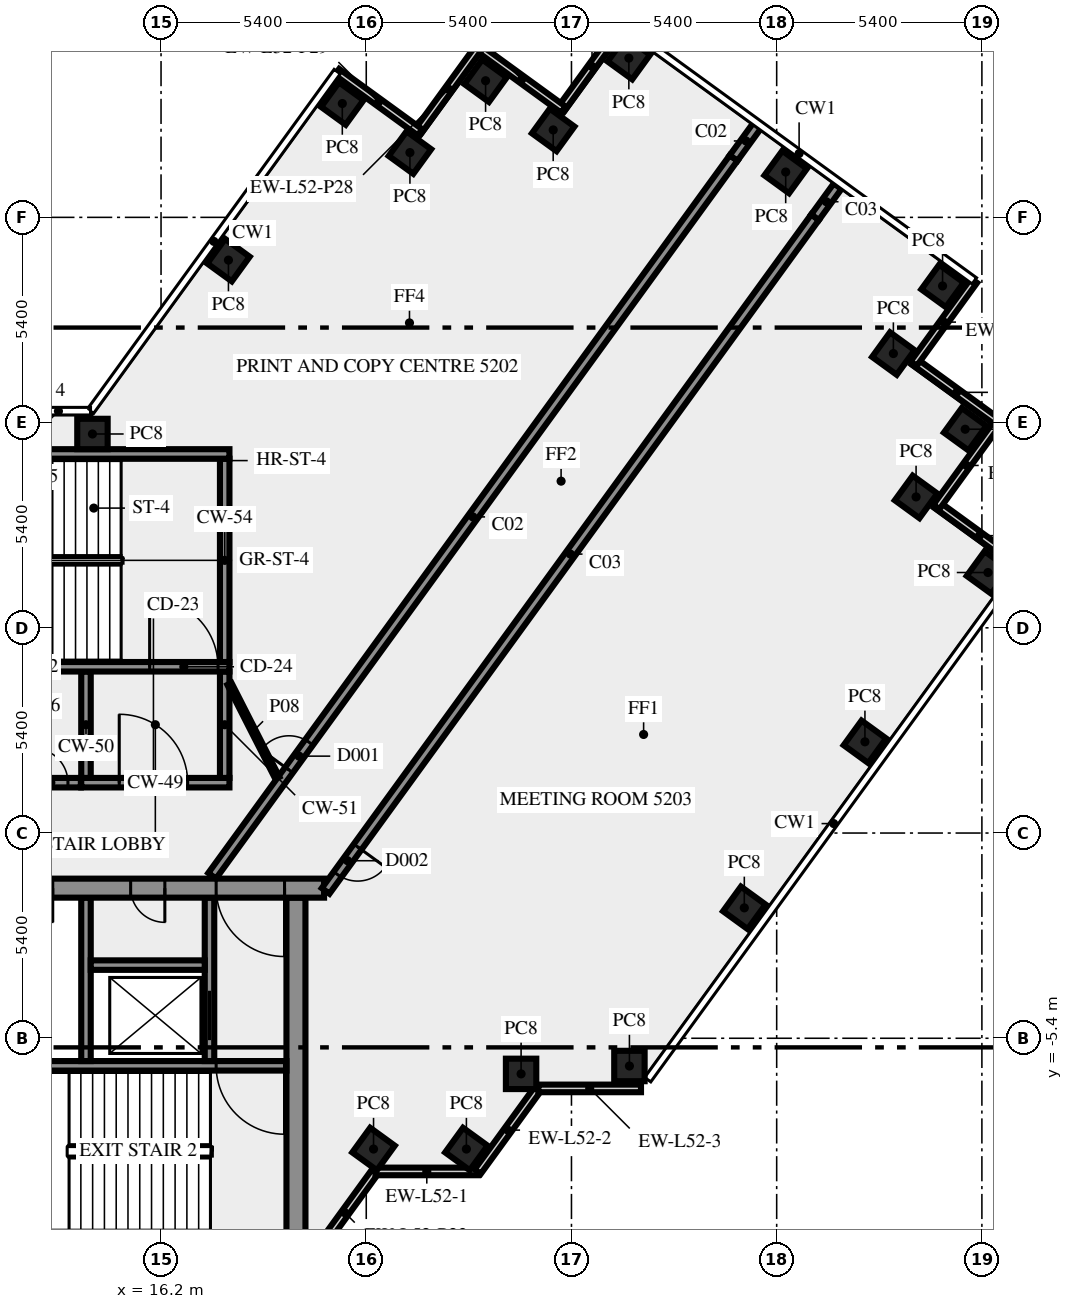
"""IFC4 building model, lengths in metres.
Left out: names, types, materials, properties, quantities, classifications, styles, units other than length and angle.
Written with IfcOpenShell. Run it as: python <this file> out.ifc"""

import sys

from ifc_helpers import new_model, si_unit, direction, frame, frame_2d, origin, origin_2d, place, context, subcontext, project, spatial, rectangle, extrude, element, fill, save


model = new_model("IFC4")
c1 = context("Model", 3, precision=1e-05, world=origin(), true_north=direction((0.0, 1.0)))
c2 = subcontext(c1, "Body", "Model", "MODEL_VIEW")
j1 = project(units=[si_unit("LENGTHUNIT", "METRE"), si_unit("PLANEANGLEUNIT", "RADIAN")], contexts=[c1])
p1 = place(None, origin())
s1 = spatial("IfcSite", under=j1, at=p1, CompositionType="ELEMENT")
p2 = place(p1, origin())
s2 = spatial("IfcBuilding", under=s1, at=p2, CompositionType="ELEMENT")
p3 = place(p2, frame((0.0, 0.0, 222.0)))
s3 = spatial("IfcBuildingStorey", under=s2, at=p3, CompositionType="ELEMENT", Elevation=222.0)
for number, where, z_axis, x_axis in (
    (1, (21.792, -8.315, 0.0), (0.0, 0.0, 1.0), (0.588, 0.809, 0.0)),
    (2, (24.235, -8.315, 0.0), (0.0, 0.0, 1.0), (0.588, 0.809, 0.0)),
    (3, (25.674, -6.337, 0.0), (0.0, 0.0, 1.0), (1.0, 0.0, 0.0)),
    (4, (28.525, -6.13, 0.0), (0.0, 0.0, 1.0), (1.0, 0.0, 0.0)),
    (5, (31.548, -1.969, 0.0), (0.0, 0.0, 1.0), (0.588, 0.809, 0.0)),
    (6, (34.722, 2.4, 0.0), (0.0, 0.0, 1.0), (0.588, 0.809, 0.0)),
    (7, (37.96, 6.855, 0.0), (0.0, 0.0, 1.0), (0.588, 0.809, 0.0)),
    (8, (36.068, 8.844, 0.0), (0.0, 0.0, 1.0), (0.588, 0.809, 0.0)),
    (9, (37.36, 10.625, 0.0), (0.0, 0.0, 1.0), (0.588, 0.809, 0.0)),
    (10, (35.471, 12.616, 0.0), (0.0, 0.0, 1.0), (-0.809, 0.588, 0.0)),
    (11, (36.765, 14.395, 0.0), (0.0, 0.0, 1.0), (-0.809, 0.588, 0.0)),
    (12, (32.637, 17.393, 0.0), (0.0, 0.0, 1.0), (-0.809, 0.588, 0.0)),
    (13, (28.51, 20.39, 0.0), (0.0, 0.0, 1.0), (-0.588, -0.809, 0.0)),
    (14, (26.519, 18.5, 0.0), (0.0, 0.0, 1.0), (-0.809, 0.588, 0.0)),
    (15, (24.74, 19.795, 0.0), (0.0, 0.0, 1.0), (-0.588, -0.809, 0.0)),
    (16, (22.749, 17.904, 0.0), (0.0, 0.0, 1.0), (-0.588, -0.809, 0.0)),
    (17, (20.97, 19.195, 0.0), (0.0, 0.0, 1.0), (-0.588, -0.809, 0.0)),
    (18, (17.974, 15.075, 0.0), (0.0, 0.0, 1.0), (-0.588, -0.809, 0.0)),
    (19, (14.395, 10.5, 0.0), (0.0, 0.0, 1.0), (-1.0, 0.0, 0.0)),
):
    element("IfcColumn", number, at=place(p3, frame(where, z_axis=z_axis, x_axis=x_axis)), inside=s3, PredefinedType="COLUMN", context=c2, shape_type="SweptSolid", body=[
        extrude(rectangle(XDim=0.8, YDim=0.8, at=origin_2d()), origin(), (0.0, 0.0, 1.0), 3.65),
    ])
for number, where, z_axis, x_axis in (
    (20, (38.829, 7.031, 0.0), (0.0, 0.0, 1.0), (-0.809, 0.588, 0.0)),
    (21, (36.602, 8.58, 0.0), (0.0, 0.0, 1.0), (0.588, 0.809, 0.0)),
    (22, (38.231, 10.802, 0.0), (0.0, 0.0, 1.0), (-0.809, 0.588, 0.0)),
):
    element("IfcWall", number, at=place(p3, frame(where, z_axis=z_axis, x_axis=x_axis)), inside=s3, PredefinedType="SOLIDWALL", context=c2, shape_type="SweptSolid", body=[
        extrude(rectangle(XDim=2.7, YDim=0.2, at=frame_2d((1.35, 0.0))), origin(), (0.0, 0.0, 1.0), 3.65),
    ])
p4 = place(p3, frame((20.253, -11.083, 0.0), z_axis=(0.0, 0.0, 1.0), x_axis=(0.587766567315, 0.809030569476, 0.0)))
e23 = element("IfcWall", 23, at=p4, inside=s3, PredefinedType="SOLIDWALL", context=c2, shape_type="SweptSolid", body=[
    extrude(rectangle(XDim=2.688, YDim=0.2, at=frame_2d((1.344, 0.0))), origin(), (0.0, 0.0, 1.0), 3.65),
])
for number, where, z_axis, x_axis in (
    (24, (36.005, 12.352, 0.0), (0.0, 0.0, 1.0), (0.588, 0.809, 0.0)),
    (25, (28.334, 21.262, 0.0), (0.0, 0.0, 1.0), (-0.588, -0.809, 0.0)),
):
    element("IfcWall", number, at=place(p3, frame(where, z_axis=z_axis, x_axis=x_axis)), inside=s3, PredefinedType="SOLIDWALL", context=c2, shape_type="SweptSolid", body=[
        extrude(rectangle(XDim=2.7, YDim=0.2, at=frame_2d((1.35, 0.0))), origin(), (0.0, 0.0, 1.0), 3.65),
    ])
p5 = place(p3, frame((26.785, 19.036, 0.0), z_axis=(0.0, 0.0, 1.0), x_axis=(-0.809064397168, 0.587720002413, 0.0)))
e26 = element("IfcWall", 26, at=p5, inside=s3, PredefinedType="SOLIDWALL", context=c2, shape_type="SweptSolid", body=[
    extrude(rectangle(XDim=2.7, YDim=0.2, at=frame_2d((1.35, 0.0))), origin(), (0.0, 0.0, 1.0), 3.65),
])
for number, where, z_axis, x_axis in (
    (27, (24.563, 20.665, 0.0), (0.0, 0.0, 1.0), (-0.588, -0.809, 0.0)),
    (28, (23.013, 18.438, 0.0), (0.0, 0.0, 1.0), (-0.809, 0.588, 0.0)),
    (29, (21.843, -8.904, 0.0), (0.0, 0.0, 1.0), (1.0, 0.0, 0.0)),
):
    element("IfcWall", number, at=place(p3, frame(where, z_axis=z_axis, x_axis=x_axis)), inside=s3, PredefinedType="SOLIDWALL", context=c2, shape_type="SweptSolid", body=[
        extrude(rectangle(XDim=2.7, YDim=0.2, at=frame_2d((1.35, 0.0))), origin(), (0.0, 0.0, 1.0), 3.65),
    ])
p6 = place(p3, frame((24.533, -8.909, 0.0), z_axis=(0.0, 0.0, 1.0), x_axis=(0.587720002413, 0.809064397168, 0.0)))
e30 = element("IfcWall", 30, at=p6, inside=s3, PredefinedType="SOLIDWALL", context=c2, shape_type="SweptSolid", body=[
    extrude(rectangle(XDim=2.7, YDim=0.2, at=frame_2d((1.35, 0.0))), origin(), (0.0, 0.0, 1.0), 3.65),
])
p7 = place(p3, frame((26.13, -6.719, 0.0), z_axis=(0.0, 0.0, 1.0), x_axis=(1.0, 0.0, 0.0)))
e31 = element("IfcWall", 31, at=p7, inside=s3, PredefinedType="SOLIDWALL", context=c2, shape_type="SweptSolid", body=[
    extrude(rectangle(XDim=2.7, YDim=0.2, at=frame_2d((1.35, 0.0))), origin(), (0.0, 0.0, 1.0), 3.65),
])
p8 = place(p3, frame((19.75, -10.5, 0.0), z_axis=(0.0, 0.0, 1.0), x_axis=(0.0, 1.0, 0.0)))
e32 = element("IfcWall", 32, at=p8, inside=s3, PredefinedType="SHEAR", context=c2, shape_type="SweptSolid", body=[
    extrude(rectangle(XDim=8.8, YDim=0.5, at=frame_2d((4.4, 0.0))), origin(), (0.0, 0.0, 1.0), 3.65),
])
p9 = place(p3, frame((19.5, -6.125, 0.0), z_axis=(0.0, 0.0, 1.0), x_axis=(-1.0, 0.0, 0.0)))
e33 = element("IfcWall", 33, at=p9, inside=s3, PredefinedType="SHEAR", context=c2, shape_type="SweptSolid", body=[
    extrude(rectangle(XDim=8.05, YDim=0.25, at=frame_2d((4.025, 0.0))), origin(), (0.0, 0.0, 1.0), 3.65),
])
p10 = place(p9, frame((0.05, 0.0, 0.0)))
e34 = element("IfcOpeningElement", 34, at=p10, cuts=e33, PredefinedType="OPENING", context=c2, shape_type="SweptSolid", body=[
    extrude(rectangle(XDim=1.8, YDim=2.1, at=frame_2d((0.9, 1.05))), frame((0.0, 0.135, 0.0), z_axis=(0.0, -1.0, 0.0), x_axis=(1.0, 0.0, 0.0)), (0.0, 0.0, 1.0), 0.27),
])
p11 = place(p3, frame((14.225, -6.0, 0.0), z_axis=(0.0, 0.0, 1.0), x_axis=(0.0, 1.0, 0.0)))
e35 = element("IfcWall", 35, at=p11, inside=s3, PredefinedType="SHEAR", context=c2, shape_type="SweptSolid", body=[
    extrude(rectangle(XDim=4.3, YDim=0.25, at=frame_2d((2.15, 0.0))), origin(), (0.0, 0.0, 1.0), 3.65),
])
p12 = place(p3, frame((17.475, -6.0, 0.0), z_axis=(0.0, 0.0, 1.0), x_axis=(0.0, 1.0, 0.0)))
e36 = element("IfcWall", 36, at=p12, inside=s3, PredefinedType="SHEAR", context=c2, shape_type="SweptSolid", body=[
    extrude(rectangle(XDim=4.3, YDim=0.25, at=frame_2d((2.15, 0.0))), origin(), (0.0, 0.0, 1.0), 3.65),
])
p13 = place(p12, frame((0.55, 0.0, 0.0)))
e37 = element("IfcOpeningElement", 37, at=p13, cuts=e36, PredefinedType="OPENING", context=c2, shape_type="SweptSolid", body=[
    extrude(rectangle(XDim=1.3, YDim=2.1, at=frame_2d((0.65, 1.05))), frame((0.0, 0.135, 0.0), z_axis=(0.0, -1.0, 0.0), x_axis=(1.0, 0.0, 0.0)), (0.0, 0.0, 1.0), 0.27),
])
p14 = place(p3, frame((14.35, -3.475, 0.0), z_axis=(0.0, 0.0, 1.0), x_axis=(1.0, 0.0, 0.0)))
e38 = element("IfcWall", 38, at=p14, inside=s3, PredefinedType="SHEAR", context=c2, shape_type="SweptSolid", body=[
    extrude(rectangle(XDim=3.0, YDim=0.25, at=frame_2d((1.5, 0.0))), origin(), (0.0, 0.0, 1.0), 3.65),
])
p15 = place(p3, frame((20.49, -1.45, 0.0), z_axis=(0.0, 0.0, 1.0), x_axis=(-1.0, 0.0, 0.0)))
e39 = element("IfcWall", 39, at=p15, inside=s3, PredefinedType="SHEAR", context=c2, shape_type="SweptSolid", body=[
    extrude(rectangle(XDim=40.98, YDim=0.5, at=frame_2d((20.49, 0.0))), origin(), (0.0, 0.0, 1.0), 3.65),
])
p16 = place(p15, frame((38.14, 0.0, 0.0)))
e40 = element("IfcOpeningElement", 40, at=p16, cuts=e39, PredefinedType="OPENING", context=c2, shape_type="SweptSolid", body=[
    extrude(rectangle(XDim=1.8, YDim=2.1, at=frame_2d((0.9, 1.05))), frame((0.0, 0.26, 0.0), z_axis=(0.0, -1.0, 0.0), x_axis=(1.0, 0.0, 0.0)), (0.0, 0.0, 1.0), 0.52),
])
p17 = place(p15, frame((36.728, 0.0, 0.0)))
e41 = element("IfcOpeningElement", 41, at=p17, cuts=e39, PredefinedType="OPENING", context=c2, shape_type="SweptSolid", body=[
    extrude(rectangle(XDim=0.8, YDim=2.1, at=frame_2d((0.4, 1.05))), frame((0.0, 0.26, 0.0), z_axis=(0.0, -1.0, 0.0), x_axis=(1.0, 0.0, 0.0)), (0.0, 0.0, 1.0), 0.52),
])
p18 = place(p15, frame((35.153, 0.0, 0.0)))
e42 = element("IfcOpeningElement", 42, at=p18, cuts=e39, PredefinedType="OPENING", context=c2, shape_type="SweptSolid", body=[
    extrude(rectangle(XDim=0.8, YDim=2.1, at=frame_2d((0.4, 1.05))), frame((0.0, 0.26, 0.0), z_axis=(0.0, -1.0, 0.0), x_axis=(1.0, 0.0, 0.0)), (0.0, 0.0, 1.0), 0.52),
])
p19 = place(p15, frame((32.94, 0.0, 0.0)))
e43 = element("IfcOpeningElement", 43, at=p19, cuts=e39, PredefinedType="OPENING", context=c2, shape_type="SweptSolid", body=[
    extrude(rectangle(XDim=0.9, YDim=2.1, at=frame_2d((0.45, 1.05))), frame((0.0, 0.26, 0.0), z_axis=(0.0, -1.0, 0.0), x_axis=(1.0, 0.0, 0.0)), (0.0, 0.0, 1.0), 0.52),
])
p20 = place(p15, frame((30.202, 0.0, 0.0)))
e44 = element("IfcOpeningElement", 44, at=p20, cuts=e39, PredefinedType="OPENING", context=c2, shape_type="SweptSolid", body=[
    extrude(rectangle(XDim=0.9, YDim=2.1, at=frame_2d((0.45, 1.05))), frame((0.0, 0.26, 0.0), z_axis=(0.0, -1.0, 0.0), x_axis=(1.0, 0.0, 0.0)), (0.0, 0.0, 1.0), 0.52),
])
p21 = place(p15, frame((27.74, 0.0, 0.0)))
e45 = element("IfcOpeningElement", 45, at=p21, cuts=e39, PredefinedType="OPENING", context=c2, shape_type="SweptSolid", body=[
    extrude(rectangle(XDim=0.9, YDim=2.1, at=frame_2d((0.45, 1.05))), frame((0.0, 0.26, 0.0), z_axis=(0.0, -1.0, 0.0), x_axis=(1.0, 0.0, 0.0)), (0.0, 0.0, 1.0), 0.52),
])
p22 = place(p15, frame((25.377, 0.0, 0.0)))
e46 = element("IfcOpeningElement", 46, at=p22, cuts=e39, PredefinedType="OPENING", context=c2, shape_type="SweptSolid", body=[
    extrude(rectangle(XDim=0.9, YDim=2.1, at=frame_2d((0.45, 1.05))), frame((0.0, 0.26, 0.0), z_axis=(0.0, -1.0, 0.0), x_axis=(1.0, 0.0, 0.0)), (0.0, 0.0, 1.0), 0.52),
])
p23 = place(p15, frame((20.74, 0.0, 0.0)))
e47 = element("IfcOpeningElement", 47, at=p23, cuts=e39, PredefinedType="OPENING", context=c2, shape_type="SweptSolid", body=[
    extrude(rectangle(XDim=2.0, YDim=2.1, at=frame_2d((1.0, 1.05))), frame((0.0, 0.26, 0.0), z_axis=(0.0, -1.0, 0.0), x_axis=(1.0, 0.0, 0.0)), (0.0, 0.0, 1.0), 0.52),
])
p24 = place(p15, frame((7.14, 0.0, 0.0)))
e48 = element("IfcOpeningElement", 48, at=p24, cuts=e39, PredefinedType="OPENING", context=c2, shape_type="SweptSolid", body=[
    extrude(rectangle(XDim=0.9, YDim=2.1, at=frame_2d((0.45, 1.05))), frame((0.0, 0.26, 0.0), z_axis=(0.0, -1.0, 0.0), x_axis=(1.0, 0.0, 0.0)), (0.0, 0.0, 1.0), 0.52),
])
p25 = place(p15, frame((4.19, 0.0, 0.0)))
e49 = element("IfcOpeningElement", 49, at=p25, cuts=e39, PredefinedType="OPENING", context=c2, shape_type="SweptSolid", body=[
    extrude(rectangle(XDim=0.9, YDim=2.1, at=frame_2d((0.45, 1.05))), frame((0.0, 0.26, 0.0), z_axis=(0.0, -1.0, 0.0), x_axis=(1.0, 0.0, 0.0)), (0.0, 0.0, 1.0), 0.52),
])
p26 = place(p15, frame((1.04, 0.0, 0.0)))
e50 = element("IfcOpeningElement", 50, at=p26, cuts=e39, PredefinedType="OPENING", context=c2, shape_type="SweptSolid", body=[
    extrude(rectangle(XDim=1.8, YDim=2.1, at=frame_2d((0.9, 1.05))), frame((0.0, 0.26, 0.0), z_axis=(0.0, -1.0, 0.0), x_axis=(1.0, 0.0, 0.0)), (0.0, 0.0, 1.0), 0.52),
])
p27 = place(p3, frame((14.1, 1.325, 0.0), z_axis=(0.0, 0.0, 1.0), x_axis=(1.0, 0.0, 0.0)))
e51 = element("IfcWall", 51, at=p27, inside=s3, PredefinedType="SHEAR", context=c2, shape_type="SweptSolid", body=[
    extrude(rectangle(XDim=3.9, YDim=0.25, at=frame_2d((1.95, 0.0))), origin(), (0.0, 0.0, 1.0), 3.65),
])
p28 = place(p27, frame((1.0, 0.0, 0.0)))
e52 = element("IfcOpeningElement", 52, at=p28, cuts=e51, PredefinedType="OPENING", context=c2, shape_type="SweptSolid", body=[
    extrude(rectangle(XDim=1.8, YDim=2.1, at=frame_2d((0.9, 1.05))), frame((0.0, 0.135, 0.0), z_axis=(0.0, -1.0, 0.0), x_axis=(1.0, 0.0, 0.0)), (0.0, 0.0, 1.0), 0.27),
])
for number, where, z_axis, x_axis in (
    (53, (14.225, 1.45, 0.0), (0.0, 0.0, 1.0), (0.0, 1.0, 0.0)),
    (54, (17.875, 1.45, 0.0), (0.0, 0.0, 1.0), (0.0, 1.0, 0.0)),
):
    element("IfcWall", number, at=place(p3, frame(where, z_axis=z_axis, x_axis=x_axis)), inside=s3, PredefinedType="SHEAR", context=c2, shape_type="SweptSolid", body=[
        extrude(rectangle(XDim=2.8, YDim=0.25, at=frame_2d((1.4, 0.0))), origin(), (0.0, 0.0, 1.0), 3.65),
    ])
p29 = place(p3, frame((7.5, 4.375, 0.0), z_axis=(0.0, 0.0, 1.0), x_axis=(1.0, 0.0, 0.0)))
e55 = element("IfcWall", 55, at=p29, inside=s3, PredefinedType="SHEAR", context=c2, shape_type="SweptSolid", body=[
    extrude(rectangle(XDim=10.5, YDim=0.25, at=frame_2d((5.25, 0.0))), origin(), (0.0, 0.0, 1.0), 3.65),
])
p30 = place(p29, frame((8.4, 0.0, 0.0)))
e56 = element("IfcOpeningElement", 56, at=p30, cuts=e55, PredefinedType="OPENING", context=c2, shape_type="SweptSolid", body=[
    extrude(rectangle(XDim=1.8, YDim=2.1, at=frame_2d((0.9, 1.05))), frame((0.0, 0.135, 0.0), z_axis=(0.0, -1.0, 0.0), x_axis=(1.0, 0.0, 0.0)), (0.0, 0.0, 1.0), 0.27),
])
p31 = place(p3, frame((17.875, 4.5, 0.0), z_axis=(0.0, 0.0, 1.0), x_axis=(0.0, 1.0, 0.0)))
e57 = element("IfcWall", 57, at=p31, inside=s3, PredefinedType="SHEAR", context=c2, shape_type="SweptSolid", body=[
    extrude(rectangle(XDim=5.35, YDim=0.25, at=frame_2d((2.675, 0.0))), origin(), (0.0, 0.0, 1.0), 3.65),
])
p32 = place(p3, frame((7.5, 9.975, 0.0), z_axis=(0.0, 0.0, 1.0), x_axis=(1.0, 0.0, 0.0)))
e58 = element("IfcWall", 58, at=p32, inside=s3, PredefinedType="SHEAR", context=c2, shape_type="SweptSolid", body=[
    extrude(rectangle(XDim=10.5, YDim=0.25, at=frame_2d((5.25, 0.0))), origin(), (0.0, 0.0, 1.0), 3.65),
])
p33 = place(p32, frame((2.0, 0.0, 1.0)))
e59 = element("IfcOpeningElement", 59, at=p33, cuts=e58, PredefinedType="OPENING", context=c2, shape_type="SweptSolid", body=[
    extrude(rectangle(XDim=1.2, YDim=1.2, at=frame_2d((0.6, 0.6))), frame((0.0, 0.135, 0.0), z_axis=(0.0, -1.0, 0.0), x_axis=(1.0, 0.0, 0.0)), (0.0, 0.0, 1.0), 0.27),
])
p34 = place(p3, frame((6.659, 1.325, 0.0), z_axis=(0.0, 0.0, 1.0), x_axis=(1.0, 0.0, 0.0)))
e60 = element("IfcWall", 60, at=p34, inside=s3, PredefinedType="SOLIDWALL", context=c2, shape_type="SweptSolid", body=[
    extrude(rectangle(XDim=7.431, YDim=0.25, at=frame_2d((3.716, 0.0))), origin(), (0.0, 0.0, 1.0), 3.65),
])
p35 = place(p34, frame((6.191, 0.0, 0.0)))
e61 = element("IfcOpeningElement", 61, at=p35, cuts=e60, PredefinedType="OPENING", context=c2, shape_type="SweptSolid", body=[
    extrude(rectangle(XDim=0.9, YDim=2.1, at=frame_2d((0.45, 1.05))), frame((0.0, 0.135, 0.0), z_axis=(0.0, -1.0, 0.0), x_axis=(1.0, 0.0, 0.0)), (0.0, 0.0, 1.0), 0.27),
])
p36 = place(p3, frame((17.545, -1.125, 0.0), z_axis=(0.0, 0.0, 1.0), x_axis=(0.587787966774, 0.809015022181, 0.0)))
e62 = element("IfcWall", 62, at=p36, inside=s3, PredefinedType="SOLIDWALL", context=c2, shape_type="SweptSolid", body=[
    extrude(rectangle(XDim=23.345, YDim=0.25, at=frame_2d((11.672, 0.0))), origin(), (0.0, 0.0, 1.0), 3.65),
])
p37 = place(p36, frame((3.441, 0.0, 0.0)))
e63 = element("IfcOpeningElement", 63, at=p37, cuts=e62, PredefinedType="OPENING", context=c2, shape_type="SweptSolid", body=[
    extrude(rectangle(XDim=0.9, YDim=2.1, at=frame_2d((0.45, 1.05))), frame((0.0, 0.135, 0.0), z_axis=(0.0, -1.0, 0.0), x_axis=(1.0, 0.0, 0.0)), (0.0, 0.0, 1.0), 0.27),
])
p38 = place(p3, frame((33.41, 16.203, 0.0), z_axis=(0.0, 0.0, 1.0), x_axis=(-0.587786711753, -0.809015934013, 0.0)))
e64 = element("IfcWall", 64, at=p38, inside=s3, PredefinedType="SOLIDWALL", context=c2, shape_type="SweptSolid", body=[
    extrude(rectangle(XDim=21.911, YDim=0.25, at=frame_2d((10.956, 0.0))), origin(), (0.0, 0.0, 1.0), 3.65),
])
p39 = place(p38, frame((20.479, 0.0, 0.0)))
e65 = element("IfcOpeningElement", 65, at=p39, cuts=e64, PredefinedType="OPENING", context=c2, shape_type="SweptSolid", body=[
    extrude(rectangle(XDim=0.9, YDim=2.1, at=frame_2d((0.45, 1.05))), frame((0.0, 0.135, 0.0), z_axis=(0.0, -1.0, 0.0), x_axis=(1.0, 0.0, 0.0)), (0.0, 0.0, 1.0), 0.27),
])
p40 = place(p3, frame((18.0, 3.925, 0.0), z_axis=(0.0, 0.0, 1.0), x_axis=(0.453950796792, -0.891026752736, 0.0)))
e66 = element("IfcWall", 66, at=p40, inside=s3, PredefinedType="PARTITIONING", context=c2, shape_type="SweptSolid", body=[
    extrude(rectangle(XDim=2.778, YDim=0.12, at=frame_2d((1.389, 0.0))), origin(), (0.0, 0.0, 1.0), 3.65),
])
p41 = place(p3, frame((31.267, 17.762, 0.0), z_axis=(0.0, 0.0, 1.0), x_axis=(0.587778942742, 0.809021578494, 0.0)))
e67 = element("IfcWall", 67, at=p41, inside=s3, PredefinedType="SOLIDWALL", context=c2, shape_type="SweptSolid", body=[
    extrude(rectangle(XDim=1.109, YDim=0.25, at=frame_2d((0.555, 0.0))), origin(), (0.0, 0.0, 1.0), 2.85),
])
p42 = place(p3, frame((33.41, 16.203, 0.0), z_axis=(0.0, 0.0, 1.0), x_axis=(0.587696850957, 0.809081214326, 0.0)))
e68 = element("IfcWall", 68, at=p42, inside=s3, PredefinedType="SOLIDWALL", context=c2, shape_type="SweptSolid", body=[
    extrude(rectangle(XDim=1.009, YDim=0.25, at=frame_2d((0.504, 0.0))), origin(), (0.0, 0.0, 1.0), 2.85),
])
p43 = place(p10, origin())
e69 = element("IfcDoor", 69, at=p43, inside=s3, OperationType="DOUBLE_DOOR_SINGLE_SWING", PredefinedType="DOOR", context=c2, shape_type="SweptSolid", body=[
    extrude(rectangle(XDim=1.8, YDim=2.1, at=frame_2d((0.9, 1.05))), frame((0.0, 0.025, 0.0), z_axis=(0.0, -1.0, 0.0), x_axis=(1.0, 0.0, 0.0)), (0.0, 0.0, 1.0), 0.05),
])
fill(e34, e69)
p44 = place(p13, origin())
e70 = element("IfcDoor", 70, at=p44, inside=s3, OperationType="DOUBLE_DOOR_SLIDING", PredefinedType="DOOR", context=c2, shape_type="SweptSolid", body=[
    extrude(rectangle(XDim=1.3, YDim=2.1, at=frame_2d((0.65, 1.05))), frame((0.0, 0.025, 0.0), z_axis=(0.0, -1.0, 0.0), x_axis=(1.0, 0.0, 0.0)), (0.0, 0.0, 1.0), 0.05),
])
fill(e37, e70)
p45 = place(p25, origin())
e71 = element("IfcDoor", 71, at=p45, inside=s3, OperationType="SINGLE_SWING_LEFT", PredefinedType="DOOR", context=c2, shape_type="SweptSolid", body=[
    extrude(rectangle(XDim=0.9, YDim=2.1, at=frame_2d((0.45, 1.05))), frame((0.0, 0.025, 0.0), z_axis=(0.0, -1.0, 0.0), x_axis=(1.0, 0.0, 0.0)), (0.0, 0.0, 1.0), 0.05),
])
fill(e49, e71)
p46 = place(p26, origin())
e72 = element("IfcDoor", 72, at=p46, inside=s3, OperationType="DOUBLE_DOOR_SINGLE_SWING", PredefinedType="DOOR", context=c2, shape_type="SweptSolid", body=[
    extrude(rectangle(XDim=1.8, YDim=2.1, at=frame_2d((0.9, 1.05))), frame((0.0, 0.025, 0.0), z_axis=(0.0, -1.0, 0.0), x_axis=(1.0, 0.0, 0.0)), (0.0, 0.0, 1.0), 0.05),
])
fill(e50, e72)
p47 = place(p28, origin())
e73 = element("IfcDoor", 73, at=p47, inside=s3, OperationType="DOUBLE_DOOR_SINGLE_SWING", PredefinedType="DOOR", context=c2, shape_type="SweptSolid", body=[
    extrude(rectangle(XDim=1.8, YDim=2.1, at=frame_2d((0.9, 1.05))), frame((0.0, 0.025, 0.0), z_axis=(0.0, -1.0, 0.0), x_axis=(1.0, 0.0, 0.0)), (0.0, 0.0, 1.0), 0.05),
])
fill(e52, e73)
p48 = place(p30, origin())
e74 = element("IfcDoor", 74, at=p48, inside=s3, OperationType="DOUBLE_DOOR_SINGLE_SWING", PredefinedType="DOOR", context=c2, shape_type="SweptSolid", body=[
    extrude(rectangle(XDim=1.8, YDim=2.1, at=frame_2d((0.9, 1.05))), frame((0.0, 0.025, 0.0), z_axis=(0.0, -1.0, 0.0), x_axis=(1.0, 0.0, 0.0)), (0.0, 0.0, 1.0), 0.05),
])
fill(e56, e74)
p49 = place(p39, origin())
e75 = element("IfcDoor", 75, at=p49, inside=s3, OperationType="SINGLE_SWING_RIGHT", PredefinedType="DOOR", context=c2, shape_type="SweptSolid", body=[
    extrude(rectangle(XDim=0.9, YDim=2.1, at=frame_2d((0.45, 1.05))), frame((0.0, 0.025, 0.0), z_axis=(0.0, -1.0, 0.0), x_axis=(1.0, 0.0, 0.0)), (0.0, 0.0, 1.0), 0.05),
])
fill(e65, e75)
p50 = place(p37, origin())
e76 = element("IfcDoor", 76, at=p50, inside=s3, OperationType="SINGLE_SWING_LEFT", PredefinedType="DOOR", context=c2, shape_type="SweptSolid", body=[
    extrude(rectangle(XDim=0.9, YDim=2.1, at=frame_2d((0.45, 1.05))), frame((0.0, 0.025, 0.0), z_axis=(0.0, -1.0, 0.0), x_axis=(1.0, 0.0, 0.0)), (0.0, 0.0, 1.0), 0.05),
])
fill(e63, e76)
p51 = place(p35, origin())
e77 = element("IfcDoor", 77, at=p51, inside=s3, OperationType="SINGLE_SWING_RIGHT", PredefinedType="DOOR", context=c2, shape_type="SweptSolid", body=[
    extrude(rectangle(XDim=0.9, YDim=2.1, at=frame_2d((0.45, 1.05))), frame((0.0, 0.025, 0.0), z_axis=(0.0, -1.0, 0.0), x_axis=(1.0, 0.0, 0.0)), (0.0, 0.0, 1.0), 0.05),
])
fill(e61, e77)
save(model, sys.argv[1])
